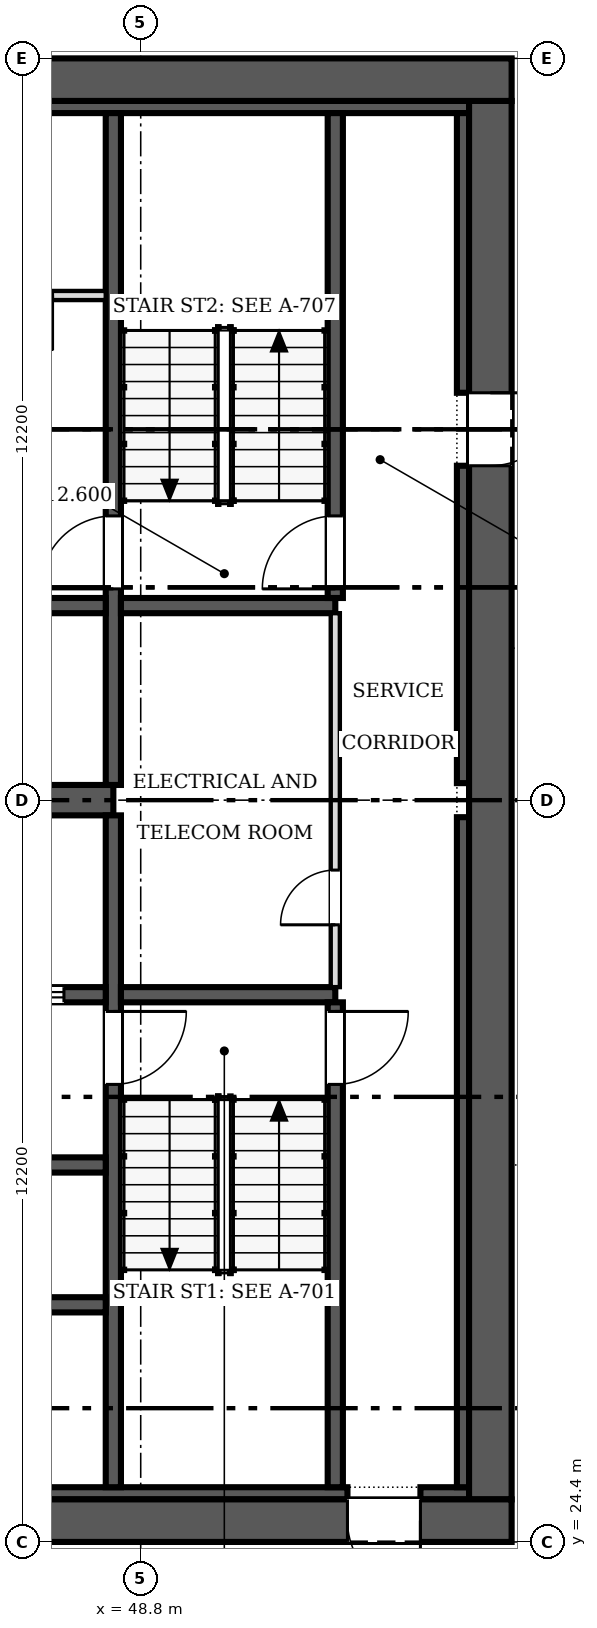
"""IFC4 building model, lengths in metres.
Left out: names, types, materials, properties, quantities, classifications, styles, units other than length and angle.
Written with IfcOpenShell. Run it as: python <this file> out.ifc"""

import sys

from ifc_helpers import new_model, si_unit, direction, frame, frame_2d, origin, place, context, subcontext, project, spatial, rectangle, extrude, source, transform, mapped, element, fill, save


model = new_model("IFC4")
c1 = context("Model", 3, precision=1e-05, world=origin(), true_north=direction((0.0, 1.0)))
c2 = subcontext(c1, "Body", "Model", "MODEL_VIEW")
j1 = project(units=[si_unit("LENGTHUNIT", "METRE"), si_unit("PLANEANGLEUNIT", "RADIAN")], contexts=[c1])
p1 = place(None, origin())
s1 = spatial("IfcSite", under=j1, at=p1, CompositionType="ELEMENT")
p2 = place(p1, origin())
s2 = spatial("IfcBuilding", under=s1, at=p2, CompositionType="ELEMENT")
p3 = place(p2, frame((0.0, 0.0, 112.6)))
s3 = spatial("IfcBuildingStorey", under=s2, at=p3, CompositionType="ELEMENT", Elevation=112.6)
p4 = place(p3, frame((54.9, 24.75, 0.0), z_axis=(0.0, 0.0, 1.0), x_axis=(-1.0, 0.0, 0.0)))
e1 = element("IfcWall", 1, at=p4, inside=s3, PredefinedType="SHEAR", context=c2, shape_type="SweptSolid", body=[
    extrude(rectangle(XDim=24.4, YDim=0.7, at=frame_2d((12.2, 0.0))), origin(), (0.0, 0.0, 1.0), 3.8),
])
m1 = source(origin(), c2, "Body", "SweptSolid", [
    extrude(rectangle(XDim=1.2, YDim=2.1, at=frame_2d((0.6, 1.05))), frame((0.0, 0.36, 0.0), z_axis=(0.0, -1.0, 0.0), x_axis=(1.0, 0.0, 0.0)), (0.0, 0.0, 1.0), 0.72),
])
p5 = place(p4, frame((1.5, 0.0, 0.0)))
e2 = element("IfcOpeningElement", 2, at=p5, cuts=e1, PredefinedType="OPENING", context=c2, shape_type="MappedRepresentation", body=[
    mapped(m1, transform((0.0, 0.0, 0.0), scale=1.0)),
])
p6 = place(p3, frame((30.5, 48.45, 0.0), z_axis=(0.0, 0.0, 1.0), x_axis=(1.0, 0.0, 0.0)))
e3 = element("IfcWall", 3, at=p6, inside=s3, PredefinedType="SHEAR", context=c2, shape_type="SweptSolid", body=[
    extrude(rectangle(XDim=24.4, YDim=0.7, at=frame_2d((12.2, 0.0))), origin(), (0.0, 0.0, 1.0), 3.8),
])
p7 = place(p3, frame((54.55, 48.1, 0.0), z_axis=(0.0, 0.0, 1.0), x_axis=(0.0, -1.0, 0.0)))
e4 = element("IfcWall", 4, at=p7, inside=s3, PredefinedType="SHEAR", context=c2, shape_type="SweptSolid", body=[
    extrude(rectangle(XDim=23.0, YDim=0.7, at=frame_2d((11.5, 0.0))), origin(), (0.0, 0.0, 1.0), 3.8),
])
p8 = place(p7, frame((4.8, 0.0, 0.0)))
e5 = element("IfcOpeningElement", 5, at=p8, cuts=e4, PredefinedType="OPENING", context=c2, shape_type="MappedRepresentation", body=[
    mapped(m1, transform((0.0, 0.0, 0.0), scale=1.0)),
])
p9 = place(p3, frame((31.2, 25.2, 0.0), z_axis=(0.0, 0.0, 1.0), x_axis=(1.0, 0.0, 0.0)))
e6 = element("IfcWall", 6, at=p9, inside=s3, PredefinedType="SOLIDWALL", context=c2, shape_type="SweptSolid", body=[
    extrude(rectangle(XDim=21.0, YDim=0.2, at=frame_2d((10.5, 0.0))), origin(), (0.0, 0.0, 1.0), 3.8),
])
p10 = place(p3, frame((53.4, 25.2, 0.0), z_axis=(0.0, 0.0, 1.0), x_axis=(1.0, 0.0, 0.0)))
e7 = element("IfcWall", 7, at=p10, inside=s3, PredefinedType="SOLIDWALL", context=c2, shape_type="SweptSolid", body=[
    extrude(rectangle(XDim=0.8, YDim=0.2, at=frame_2d((0.4, 0.0))), origin(), (0.0, 0.0, 1.0), 3.8),
])
p11 = place(p3, frame((31.2, 48.0, 0.0), z_axis=(0.0, 0.0, 1.0), x_axis=(1.0, 0.0, 0.0)))
e8 = element("IfcWall", 8, at=p11, inside=s3, PredefinedType="SOLIDWALL", context=c2, shape_type="SweptSolid", body=[
    extrude(rectangle(XDim=23.0, YDim=0.2, at=frame_2d((11.5, 0.0))), origin(), (0.0, 0.0, 1.0), 3.8),
])
p12 = place(p3, frame((54.1, 25.3, 0.0), z_axis=(0.0, 0.0, 1.0), x_axis=(0.0, 1.0, 0.0)))
e9 = element("IfcWall", 9, at=p12, inside=s3, PredefinedType="SOLIDWALL", context=c2, shape_type="SweptSolid", body=[
    extrude(rectangle(XDim=11.02, YDim=0.2, at=frame_2d((5.51, 0.0))), origin(), (0.0, 0.0, 1.0), 3.8),
])
p13 = place(p3, frame((54.1, 36.88, 0.0), z_axis=(0.0, 0.0, 1.0), x_axis=(0.0, 1.0, 0.0)))
e10 = element("IfcWall", 10, at=p13, inside=s3, PredefinedType="SOLIDWALL", context=c2, shape_type="SweptSolid", body=[
    extrude(rectangle(XDim=5.22, YDim=0.2, at=frame_2d((2.61, 0.0))), origin(), (0.0, 0.0, 1.0), 3.8),
])
p14 = place(p3, frame((54.1, 43.3, 0.0), z_axis=(0.0, 0.0, 1.0), x_axis=(0.0, 1.0, 0.0)))
e11 = element("IfcWall", 11, at=p14, inside=s3, PredefinedType="SOLIDWALL", context=c2, shape_type="SweptSolid", body=[
    extrude(rectangle(XDim=4.6, YDim=0.2, at=frame_2d((2.3, 0.0))), origin(), (0.0, 0.0, 1.0), 3.8),
])
p15 = place(p3, frame((31.4, 36.6, 0.0), z_axis=(0.0, 0.0, 1.0), x_axis=(1.0, 0.0, 0.0)))
e12 = element("IfcWall", 12, at=p15, inside=s3, PredefinedType="SHEAR", context=c2, shape_type="SweptSolid", body=[
    extrude(rectangle(XDim=16.95, YDim=0.5, at=frame_2d((8.475, 0.0))), origin(), (0.0, 0.0, 1.0), 3.8),
])
p16 = place(p3, frame((48.35, 36.35, 0.0), z_axis=(0.0, 0.0, 1.0), x_axis=(0.0, -1.0, 0.0)))
e13 = element("IfcWall", 13, at=p16, inside=s3, PredefinedType="SOLIDWALL", context=c2, shape_type="SweptSolid", body=[
    extrude(rectangle(XDim=11.05, YDim=0.25, at=frame_2d((5.525, 0.0))), origin(), (0.0, 0.0, 1.0), 3.8),
])
m2 = source(origin(), c2, "Body", "SweptSolid", [
    extrude(rectangle(XDim=1.2, YDim=2.1, at=frame_2d((0.6, 1.05))), frame((0.0, 0.135, 0.0), z_axis=(0.0, -1.0, 0.0), x_axis=(1.0, 0.0, 0.0)), (0.0, 0.0, 1.0), 0.27),
])
p17 = place(p16, frame((3.225, 0.0, 0.0)))
e14 = element("IfcOpeningElement", 14, at=p17, cuts=e13, PredefinedType="OPENING", context=c2, shape_type="MappedRepresentation", body=[
    mapped(m2, transform((0.0, 0.0, 0.0), scale=1.0)),
])
p18 = place(p3, frame((48.35, 47.9, 0.0), z_axis=(0.0, 0.0, 1.0), x_axis=(0.0, -1.0, 0.0)))
e15 = element("IfcWall", 15, at=p18, inside=s3, PredefinedType="SOLIDWALL", context=c2, shape_type="SweptSolid", body=[
    extrude(rectangle(XDim=11.05, YDim=0.25, at=frame_2d((5.525, 0.0))), origin(), (0.0, 0.0, 1.0), 3.8),
])
p19 = place(p18, frame((6.625, 0.0, 0.0)))
e16 = element("IfcOpeningElement", 16, at=p19, cuts=e15, PredefinedType="OPENING", context=c2, shape_type="MappedRepresentation", body=[
    mapped(m2, transform((0.0, 0.0, 0.0), scale=1.0)),
])
p20 = place(p3, frame((42.95, 39.8, 0.0), z_axis=(0.0, 0.0, 1.0), x_axis=(1.0, 0.0, 0.0)))
e17 = element("IfcWall", 17, at=p20, inside=s3, PredefinedType="SOLIDWALL", context=c2, shape_type="SweptSolid", body=[
    extrude(rectangle(XDim=5.275, YDim=0.25, at=frame_2d((2.638, 0.0))), origin(), (0.0, 0.0, 1.0), 3.6),
])
p21 = place(p3, frame((48.475, 39.8, 0.0), z_axis=(0.0, 0.0, 1.0), x_axis=(1.0, 0.0, 0.0)))
e18 = element("IfcWall", 18, at=p21, inside=s3, PredefinedType="SOLIDWALL", context=c2, shape_type="SweptSolid", body=[
    extrude(rectangle(XDim=3.525, YDim=0.25, at=frame_2d((1.762, 0.0))), origin(), (0.0, 0.0, 1.0), 3.8),
])
p22 = place(p3, frame((48.225, 33.4, 0.0), z_axis=(0.0, 0.0, 1.0), x_axis=(-1.0, 0.0, 0.0)))
e19 = element("IfcWall", 19, at=p22, inside=s3, PredefinedType="SOLIDWALL", context=c2, shape_type="SweptSolid", body=[
    extrude(rectangle(XDim=5.275, YDim=0.25, at=frame_2d((2.638, 0.0))), origin(), (0.0, 0.0, 1.0), 3.8),
])
p23 = place(p22, frame((3.512, 0.0, 0.0)))
e20 = element("IfcOpeningElement", 20, at=p23, cuts=e19, PredefinedType="OPENING", context=c2, shape_type="MappedRepresentation", body=[
    mapped(m2, transform((0.0, 0.0, 0.0), scale=1.0)),
])
p24 = place(p22, frame((0.688, 0.0, 0.0)))
e21 = element("IfcOpeningElement", 21, at=p24, cuts=e19, PredefinedType="OPENING", context=c2, shape_type="MappedRepresentation", body=[
    mapped(m2, transform((0.0, 0.0, 0.0), scale=1.0)),
])
p25 = place(p3, frame((48.475, 33.4, 0.0), z_axis=(0.0, 0.0, 1.0), x_axis=(1.0, 0.0, 0.0)))
e22 = element("IfcWall", 22, at=p25, inside=s3, PredefinedType="SOLIDWALL", context=c2, shape_type="SweptSolid", body=[
    extrude(rectangle(XDim=3.525, YDim=0.25, at=frame_2d((1.762, 0.0))), origin(), (0.0, 0.0, 1.0), 3.8),
])
p26 = place(p3, frame((52.0, 25.3, 0.0), z_axis=(0.0, 0.0, 1.0), x_axis=(0.0, 1.0, 0.0)))
e23 = element("IfcWall", 23, at=p26, inside=s3, PredefinedType="SOLIDWALL", context=c2, shape_type="SweptSolid", body=[
    extrude(rectangle(XDim=7.975, YDim=0.25, at=frame_2d((3.987, 0.0))), origin(), (0.0, 0.0, 1.0), 3.8),
])
p27 = place(p26, frame((6.625, 0.0, 0.0)))
e24 = element("IfcOpeningElement", 24, at=p27, cuts=e23, PredefinedType="OPENING", context=c2, shape_type="MappedRepresentation", body=[
    mapped(m2, transform((0.0, 0.0, 0.0), scale=1.0)),
])
p28 = place(p3, frame((52.0, 39.925, 0.0), z_axis=(0.0, 0.0, 1.0), x_axis=(0.0, 1.0, 0.0)))
e25 = element("IfcWall", 25, at=p28, inside=s3, PredefinedType="SOLIDWALL", context=c2, shape_type="SweptSolid", body=[
    extrude(rectangle(XDim=7.975, YDim=0.25, at=frame_2d((3.987, 0.0))), origin(), (0.0, 0.0, 1.0), 3.8),
])
p29 = place(p28, frame((0.15, 0.0, 0.0)))
e26 = element("IfcOpeningElement", 26, at=p29, cuts=e25, PredefinedType="OPENING", context=c2, shape_type="MappedRepresentation", body=[
    mapped(m2, transform((0.0, 0.0, 0.0), scale=1.0)),
])
for number, where, z_axis, x_axis in (
    (27, (42.95, 28.3, 0.0), (0.0, 0.0, 1.0), (1.0, 0.0, 0.0)),
    (28, (42.95, 30.6, 0.0), (0.0, 0.0, 1.0), (1.0, 0.0, 0.0)),
):
    element("IfcWall", number, at=place(p3, frame(where, z_axis=z_axis, x_axis=x_axis)), inside=s3, PredefinedType="SOLIDWALL", context=c2, shape_type="SweptSolid", body=[
        extrude(rectangle(XDim=5.275, YDim=0.25, at=frame_2d((2.638, 0.0))), origin(), (0.0, 0.0, 1.0), 3.8),
    ])
p30 = place(p3, frame((52.0, 33.525, 0.0), z_axis=(0.0, 0.0, 1.0), x_axis=(0.0, 1.0, 0.0)))
e29 = element("IfcWall", 29, at=p30, inside=s3, PredefinedType="PARTITIONING", context=c2, shape_type="SweptSolid", body=[
    extrude(rectangle(XDim=6.15, YDim=0.15, at=frame_2d((3.075, 0.0))), origin(), (0.0, 0.0, 1.0), 3.6),
])
m3 = source(origin(), c2, "Body", "SweptSolid", [
    extrude(rectangle(XDim=0.9, YDim=2.1, at=frame_2d((0.45, 1.05))), frame((0.0, 0.085, 0.0), z_axis=(0.0, -1.0, 0.0), x_axis=(1.0, 0.0, 0.0)), (0.0, 0.0, 1.0), 0.17),
])
p31 = place(p30, frame((1.025, 0.0, 0.0)))
e30 = element("IfcOpeningElement", 30, at=p31, cuts=e29, PredefinedType="OPENING", context=c2, shape_type="MappedRepresentation", body=[
    mapped(m3, transform((0.0, 0.0, 0.0), scale=1.0)),
])
p32 = place(p3, frame((45.525, 44.9, 0.0), z_axis=(0.0, 0.0, 1.0), x_axis=(1.0, 0.0, 0.0)))
e31 = element("IfcWall", 31, at=p32, inside=s3, PredefinedType="PARTITIONING", context=c2, shape_type="SweptSolid", body=[
    extrude(rectangle(XDim=2.7, YDim=0.15, at=frame_2d((1.35, 0.0))), origin(), (0.0, 0.0, 1.0), 3.6),
])
p33 = place(p32, frame((0.925, 0.0, 0.0)))
e32 = element("IfcOpeningElement", 32, at=p33, cuts=e31, PredefinedType="OPENING", context=c2, shape_type="MappedRepresentation", body=[
    mapped(m3, transform((0.0, 0.0, 0.0), scale=1.0)),
])
m4 = source(origin(), c2, "Body", "SweptSolid", [
    extrude(rectangle(XDim=1.2, YDim=2.1, at=frame_2d((0.6, 1.05))), frame((0.0, 0.025, 0.0), z_axis=(0.0, -1.0, 0.0), x_axis=(1.0, 0.0, 0.0)), (0.0, 0.0, 1.0), 0.05),
])
p34 = place(p5, origin())
e33 = element("IfcDoor", 33, at=p34, inside=s3, OperationType="SINGLE_SWING_LEFT", PredefinedType="DOOR", context=c2, shape_type="MappedRepresentation", body=[
    mapped(m4, transform((0.0, 0.0, 0.0), scale=1.0)),
])
fill(e2, e33)
p35 = place(p8, origin())
e34 = element("IfcDoor", 34, at=p35, inside=s3, OperationType="SINGLE_SWING_LEFT", PredefinedType="DOOR", context=c2, shape_type="MappedRepresentation", body=[
    mapped(m4, transform((0.0, 0.0, 0.0), scale=1.0)),
])
fill(e5, e34)
p36 = place(p17, origin())
e35 = element("IfcDoor", 35, at=p36, inside=s3, OperationType="SINGLE_SWING_LEFT", PredefinedType="DOOR", context=c2, shape_type="MappedRepresentation", body=[
    mapped(m4, transform((0.0, 0.0, 0.0), scale=1.0)),
])
fill(e14, e35)
p37 = place(p19, origin())
e36 = element("IfcDoor", 36, at=p37, inside=s3, OperationType="SINGLE_SWING_RIGHT", PredefinedType="DOOR", context=c2, shape_type="MappedRepresentation", body=[
    mapped(m4, transform((0.0, 0.0, 0.0), scale=1.0)),
])
fill(e16, e36)
p38 = place(p24, origin())
e37 = element("IfcDoor", 37, at=p38, inside=s3, OperationType="DOUBLE_DOOR_SLIDING", PredefinedType="DOOR", context=c2, shape_type="MappedRepresentation", body=[
    mapped(m4, transform((0.0, 0.0, 0.0), scale=1.0)),
])
fill(e21, e37)
p39 = place(p27, origin())
e38 = element("IfcDoor", 38, at=p39, inside=s3, OperationType="SINGLE_SWING_RIGHT", PredefinedType="DOOR", context=c2, shape_type="MappedRepresentation", body=[
    mapped(m4, transform((0.0, 0.0, 0.0), scale=1.0)),
])
fill(e24, e38)
p40 = place(p29, origin())
e39 = element("IfcDoor", 39, at=p40, inside=s3, OperationType="SINGLE_SWING_LEFT", PredefinedType="DOOR", context=c2, shape_type="MappedRepresentation", body=[
    mapped(m4, transform((0.0, 0.0, 0.0), scale=1.0)),
])
fill(e26, e39)
m5 = source(origin(), c2, "Body", "SweptSolid", [
    extrude(rectangle(XDim=0.9, YDim=2.1, at=frame_2d((0.45, 1.05))), frame((0.0, 0.025, 0.0), z_axis=(0.0, -1.0, 0.0), x_axis=(1.0, 0.0, 0.0)), (0.0, 0.0, 1.0), 0.05),
])
p41 = place(p31, origin())
e40 = element("IfcDoor", 40, at=p41, inside=s3, OperationType="SINGLE_SWING_LEFT", PredefinedType="DOOR", context=c2, shape_type="MappedRepresentation", body=[
    mapped(m5, transform((0.0, 0.0, 0.0), scale=1.0)),
])
fill(e30, e40)
save(model, sys.argv[1])
